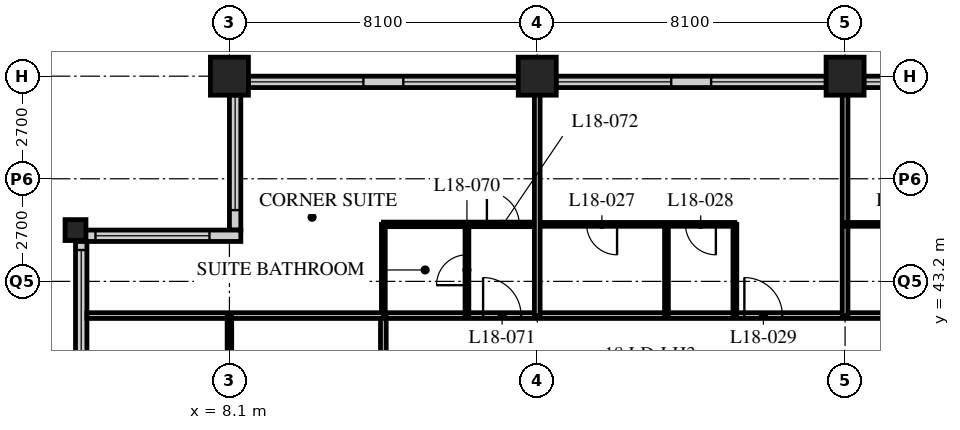
"""IFC4 building model, lengths in metres.
Left out: names, types, materials, properties, quantities, classifications, styles, units other than length and angle.
Written with IfcOpenShell. Run it as: python <this file> out.ifc"""

import sys

from ifc_helpers import new_model, si_unit, direction, frame, frame_2d, origin, origin_2d, place, context, subcontext, project, spatial, rectangle, hollow_rectangle, extrude, element, fill, save


model = new_model("IFC4")
c1 = context("Model", 3, precision=1e-05, world=origin(), true_north=direction((0.0, 1.0)))
c2 = subcontext(c1, "Body", "Model", "MODEL_VIEW")
j1 = project(units=[si_unit("LENGTHUNIT", "METRE"), si_unit("PLANEANGLEUNIT", "RADIAN")], contexts=[c1])
p1 = place(None, origin())
s1 = spatial("IfcSite", under=j1, at=p1, CompositionType="ELEMENT")
p2 = place(p1, origin())
s2 = spatial("IfcBuilding", under=s1, at=p2, CompositionType="ELEMENT")
p3 = place(p2, frame((0.0, 0.0, 73.8)))
s3 = spatial("IfcBuildingStorey", under=s2, at=p3, CompositionType="ELEMENT", Elevation=73.8)
p4 = place(p3, frame((4.05, 44.55, 0.0), z_axis=(0.0, 0.0, 1.0), x_axis=(1.0, 0.0, 0.0)))
e1 = element("IfcColumn", 1, at=p4, inside=s3, PredefinedType="COLUMN", context=c2, shape_type="SweptSolid", body=[
    extrude(hollow_rectangle(XDim=0.55, YDim=0.55, WallThickness=0.05, at=origin_2d()), origin(), (0.0, 0.0, 1.0), 3.4),
])
for number, where, z_axis, x_axis in (
    (2, (8.1, 48.6, 0.0), (0.0, 0.0, 1.0), (1.0, 0.0, 0.0)),
    (3, (16.2, 48.6, 0.0), (0.0, 0.0, 1.0), (1.0, 0.0, 0.0)),
    (4, (24.3, 48.6, 0.0), (0.0, 0.0, 1.0), (1.0, 0.0, 0.0)),
):
    element("IfcColumn", number, at=place(p3, frame(where, z_axis=z_axis, x_axis=x_axis)), inside=s3, PredefinedType="COLUMN", context=c2, shape_type="SweptSolid", body=[
        extrude(hollow_rectangle(XDim=1.0, YDim=1.0, WallThickness=0.1, at=origin_2d()), origin(), (0.0, 0.0, 1.0), 3.4),
    ])
p5 = place(p3, frame((48.3, 48.45, 0.0), z_axis=(0.0, 0.0, 1.0), x_axis=(-1.0, 0.0, 0.0)))
e5 = element("IfcWall", 5, at=p5, inside=s3, PredefinedType="SOLIDWALL", context=c2, shape_type="SweptSolid", body=[
    extrude(rectangle(XDim=40.2, YDim=0.3, at=frame_2d((20.1, 0.0))), origin(), (0.0, 0.0, 1.0), 3.19),
])
p6 = place(p5, frame((0.225, 0.0, 0.9)))
e6 = element("IfcOpeningElement", 6, at=p6, cuts=e5, PredefinedType="OPENING", context=c2, shape_type="SweptSolid", body=[
    extrude(rectangle(XDim=3.0, YDim=2.0, at=frame_2d((1.5, 1.0))), frame((0.0, 0.16, 0.0), z_axis=(0.0, -1.0, 0.0), x_axis=(1.0, 0.0, 0.0)), (0.0, 0.0, 1.0), 0.32),
])
p7 = place(p5, frame((4.275, 0.0, 0.9)))
e7 = element("IfcOpeningElement", 7, at=p7, cuts=e5, PredefinedType="OPENING", context=c2, shape_type="SweptSolid", body=[
    extrude(rectangle(XDim=3.0, YDim=2.0, at=frame_2d((1.5, 1.0))), frame((0.0, 0.16, 0.0), z_axis=(0.0, -1.0, 0.0), x_axis=(1.0, 0.0, 0.0)), (0.0, 0.0, 1.0), 0.32),
])
p8 = place(p5, frame((8.325, 0.0, 0.9)))
e8 = element("IfcOpeningElement", 8, at=p8, cuts=e5, PredefinedType="OPENING", context=c2, shape_type="SweptSolid", body=[
    extrude(rectangle(XDim=3.0, YDim=2.0, at=frame_2d((1.5, 1.0))), frame((0.0, 0.16, 0.0), z_axis=(0.0, -1.0, 0.0), x_axis=(1.0, 0.0, 0.0)), (0.0, 0.0, 1.0), 0.32),
])
p9 = place(p5, frame((12.375, 0.0, 0.9)))
e9 = element("IfcOpeningElement", 9, at=p9, cuts=e5, PredefinedType="OPENING", context=c2, shape_type="SweptSolid", body=[
    extrude(rectangle(XDim=3.0, YDim=2.0, at=frame_2d((1.5, 1.0))), frame((0.0, 0.16, 0.0), z_axis=(0.0, -1.0, 0.0), x_axis=(1.0, 0.0, 0.0)), (0.0, 0.0, 1.0), 0.32),
])
p10 = place(p5, frame((16.425, 0.0, 0.9)))
e10 = element("IfcOpeningElement", 10, at=p10, cuts=e5, PredefinedType="OPENING", context=c2, shape_type="SweptSolid", body=[
    extrude(rectangle(XDim=3.0, YDim=2.0, at=frame_2d((1.5, 1.0))), frame((0.0, 0.16, 0.0), z_axis=(0.0, -1.0, 0.0), x_axis=(1.0, 0.0, 0.0)), (0.0, 0.0, 1.0), 0.32),
])
p11 = place(p5, frame((20.475, 0.0, 0.9)))
e11 = element("IfcOpeningElement", 11, at=p11, cuts=e5, PredefinedType="OPENING", context=c2, shape_type="SweptSolid", body=[
    extrude(rectangle(XDim=3.0, YDim=2.0, at=frame_2d((1.5, 1.0))), frame((0.0, 0.16, 0.0), z_axis=(0.0, -1.0, 0.0), x_axis=(1.0, 0.0, 0.0)), (0.0, 0.0, 1.0), 0.32),
])
p12 = place(p5, frame((24.525, 0.0, 0.9)))
e12 = element("IfcOpeningElement", 12, at=p12, cuts=e5, PredefinedType="OPENING", context=c2, shape_type="SweptSolid", body=[
    extrude(rectangle(XDim=3.0, YDim=2.0, at=frame_2d((1.5, 1.0))), frame((0.0, 0.16, 0.0), z_axis=(0.0, -1.0, 0.0), x_axis=(1.0, 0.0, 0.0)), (0.0, 0.0, 1.0), 0.32),
])
p13 = place(p5, frame((28.575, 0.0, 0.9)))
e13 = element("IfcOpeningElement", 13, at=p13, cuts=e5, PredefinedType="OPENING", context=c2, shape_type="SweptSolid", body=[
    extrude(rectangle(XDim=3.0, YDim=2.0, at=frame_2d((1.5, 1.0))), frame((0.0, 0.16, 0.0), z_axis=(0.0, -1.0, 0.0), x_axis=(1.0, 0.0, 0.0)), (0.0, 0.0, 1.0), 0.32),
])
p14 = place(p5, frame((32.625, 0.0, 0.9)))
e14 = element("IfcOpeningElement", 14, at=p14, cuts=e5, PredefinedType="OPENING", context=c2, shape_type="SweptSolid", body=[
    extrude(rectangle(XDim=3.0, YDim=2.0, at=frame_2d((1.5, 1.0))), frame((0.0, 0.16, 0.0), z_axis=(0.0, -1.0, 0.0), x_axis=(1.0, 0.0, 0.0)), (0.0, 0.0, 1.0), 0.32),
])
p15 = place(p5, frame((36.675, 0.0, 0.9)))
e15 = element("IfcOpeningElement", 15, at=p15, cuts=e5, PredefinedType="OPENING", context=c2, shape_type="SweptSolid", body=[
    extrude(rectangle(XDim=3.0, YDim=2.0, at=frame_2d((1.5, 1.0))), frame((0.0, 0.16, 0.0), z_axis=(0.0, -1.0, 0.0), x_axis=(1.0, 0.0, 0.0)), (0.0, 0.0, 1.0), 0.32),
])
p16 = place(p3, frame((8.25, 48.3, 0.0), z_axis=(0.0, 0.0, 1.0), x_axis=(0.0, -1.0, 0.0)))
e16 = element("IfcWall", 16, at=p16, inside=s3, PredefinedType="SOLIDWALL", context=c2, shape_type="SweptSolid", body=[
    extrude(rectangle(XDim=3.75, YDim=0.3, at=frame_2d((1.875, 0.0))), origin(), (0.0, 0.0, 1.0), 3.19),
])
p17 = place(p16, frame((0.225, 0.0, 0.9)))
e17 = element("IfcOpeningElement", 17, at=p17, cuts=e16, PredefinedType="OPENING", context=c2, shape_type="SweptSolid", body=[
    extrude(rectangle(XDim=3.0, YDim=1.5, at=frame_2d((1.5, 0.75))), frame((0.0, 0.16, 0.0), z_axis=(0.0, -1.0, 0.0), x_axis=(1.0, 0.0, 0.0)), (0.0, 0.0, 1.0), 0.32),
])
p18 = place(p3, frame((8.4, 44.4, 0.0), z_axis=(0.0, 0.0, 1.0), x_axis=(-1.0, 0.0, 0.0)))
e18 = element("IfcWall", 18, at=p18, inside=s3, PredefinedType="SOLIDWALL", context=c2, shape_type="SweptSolid", body=[
    extrude(rectangle(XDim=4.35, YDim=0.3, at=frame_2d((2.175, 0.0))), origin(), (0.0, 0.0, 1.0), 3.19),
])
p19 = place(p18, frame((0.825, 0.0, 0.9)))
e19 = element("IfcOpeningElement", 19, at=p19, cuts=e18, PredefinedType="OPENING", context=c2, shape_type="SweptSolid", body=[
    extrude(rectangle(XDim=3.0, YDim=1.5, at=frame_2d((1.5, 0.75))), frame((0.0, 0.16, 0.0), z_axis=(0.0, -1.0, 0.0), x_axis=(1.0, 0.0, 0.0)), (0.0, 0.0, 1.0), 0.32),
])
p20 = place(p3, frame((4.2, 44.25, 0.0), z_axis=(0.0, 0.0, 1.0), x_axis=(0.0, -1.0, 0.0)))
e20 = element("IfcWall", 20, at=p20, inside=s3, PredefinedType="SOLIDWALL", context=c2, shape_type="SweptSolid", body=[
    extrude(rectangle(XDim=3.75, YDim=0.3, at=frame_2d((1.875, 0.0))), origin(), (0.0, 0.0, 1.0), 3.19),
])
p21 = place(p20, frame((0.225, 0.0, 0.9)))
e21 = element("IfcOpeningElement", 21, at=p21, cuts=e20, PredefinedType="OPENING", context=c2, shape_type="SweptSolid", body=[
    extrude(rectangle(XDim=3.0, YDim=1.5, at=frame_2d((1.5, 0.75))), frame((0.0, 0.16, 0.0), z_axis=(0.0, -1.0, 0.0), x_axis=(1.0, 0.0, 0.0)), (0.0, 0.0, 1.0), 0.32),
])
p22 = place(p3, frame((12.15, 42.3, 0.0), z_axis=(0.0, 0.0, 1.0), x_axis=(1.0, 0.0, 0.0)))
e22 = element("IfcWall", 22, at=p22, inside=s3, PredefinedType="PARTITIONING", context=c2, shape_type="SweptSolid", body=[
    extrude(rectangle(XDim=36.45, YDim=0.15, at=frame_2d((18.225, 0.0))), origin(), (0.0, 0.0, 1.0), 3.19),
])
p23 = place(p22, frame((9.5, 0.0, 0.0)))
e23 = element("IfcOpeningElement", 23, at=p23, cuts=e22, PredefinedType="OPENING", context=c2, shape_type="SweptSolid", body=[
    extrude(rectangle(XDim=1.0, YDim=2.1, at=frame_2d((0.5, 1.05))), frame((0.0, 0.085, 0.0), z_axis=(0.0, -1.0, 0.0), x_axis=(1.0, 0.0, 0.0)), (0.0, 0.0, 1.0), 0.17),
])
p24 = place(p22, frame((17.6, 0.0, 0.0)))
e24 = element("IfcOpeningElement", 24, at=p24, cuts=e22, PredefinedType="OPENING", context=c2, shape_type="SweptSolid", body=[
    extrude(rectangle(XDim=1.0, YDim=2.1, at=frame_2d((0.5, 1.05))), frame((0.0, 0.085, 0.0), z_axis=(0.0, -1.0, 0.0), x_axis=(1.0, 0.0, 0.0)), (0.0, 0.0, 1.0), 0.17),
])
p25 = place(p22, frame((22.7, 0.0, 0.0)))
e25 = element("IfcOpeningElement", 25, at=p25, cuts=e22, PredefinedType="OPENING", context=c2, shape_type="SweptSolid", body=[
    extrude(rectangle(XDim=1.0, YDim=2.1, at=frame_2d((0.5, 1.05))), frame((0.0, 0.085, 0.0), z_axis=(0.0, -1.0, 0.0), x_axis=(1.0, 0.0, 0.0)), (0.0, 0.0, 1.0), 0.17),
])
p26 = place(p22, frame((26.75, 0.0, 0.0)))
e26 = element("IfcOpeningElement", 26, at=p26, cuts=e22, PredefinedType="OPENING", context=c2, shape_type="SweptSolid", body=[
    extrude(rectangle(XDim=1.0, YDim=2.1, at=frame_2d((0.5, 1.05))), frame((0.0, 0.085, 0.0), z_axis=(0.0, -1.0, 0.0), x_axis=(1.0, 0.0, 0.0)), (0.0, 0.0, 1.0), 0.17),
])
p27 = place(p22, frame((30.8, 0.0, 0.0)))
e27 = element("IfcOpeningElement", 27, at=p27, cuts=e22, PredefinedType="OPENING", context=c2, shape_type="SweptSolid", body=[
    extrude(rectangle(XDim=1.0, YDim=2.1, at=frame_2d((0.5, 1.05))), frame((0.0, 0.085, 0.0), z_axis=(0.0, -1.0, 0.0), x_axis=(1.0, 0.0, 0.0)), (0.0, 0.0, 1.0), 0.17),
])
p28 = place(p22, frame((32.825, 0.0, 0.0)))
e28 = element("IfcOpeningElement", 28, at=p28, cuts=e22, PredefinedType="OPENING", context=c2, shape_type="SweptSolid", body=[
    extrude(rectangle(XDim=1.0, YDim=2.1, at=frame_2d((0.5, 1.05))), frame((0.0, 0.085, 0.0), z_axis=(0.0, -1.0, 0.0), x_axis=(1.0, 0.0, 0.0)), (0.0, 0.0, 1.0), 0.17),
])
p29 = place(p22, frame((2.625, 0.0, 0.0)))
e29 = element("IfcOpeningElement", 29, at=p29, cuts=e22, PredefinedType="OPENING", context=c2, shape_type="SweptSolid", body=[
    extrude(rectangle(XDim=1.0, YDim=2.1, at=frame_2d((0.5, 1.05))), frame((0.0, 0.085, 0.0), z_axis=(0.0, -1.0, 0.0), x_axis=(1.0, 0.0, 0.0)), (0.0, 0.0, 1.0), 0.17),
])
p30 = place(p3, frame((12.15, 16.2, 0.0), z_axis=(0.0, 0.0, 1.0), x_axis=(0.0, 1.0, 0.0)))
e30 = element("IfcWall", 30, at=p30, inside=s3, PredefinedType="PARTITIONING", context=c2, shape_type="SweptSolid", body=[
    extrude(rectangle(XDim=26.1, YDim=0.15, at=frame_2d((13.05, 0.0))), origin(), (0.0, 0.0, 1.0), 3.19),
])
p31 = place(p30, frame((0.3, 0.0, 0.0)))
e31 = element("IfcOpeningElement", 31, at=p31, cuts=e30, PredefinedType="OPENING", context=c2, shape_type="SweptSolid", body=[
    extrude(rectangle(XDim=1.0, YDim=2.1, at=frame_2d((0.5, 1.05))), frame((0.0, 0.085, 0.0), z_axis=(0.0, -1.0, 0.0), x_axis=(1.0, 0.0, 0.0)), (0.0, 0.0, 1.0), 0.17),
])
p32 = place(p30, frame((6.5, 0.0, 0.0)))
e32 = element("IfcOpeningElement", 32, at=p32, cuts=e30, PredefinedType="OPENING", context=c2, shape_type="SweptSolid", body=[
    extrude(rectangle(XDim=1.0, YDim=2.1, at=frame_2d((0.5, 1.05))), frame((0.0, 0.085, 0.0), z_axis=(0.0, -1.0, 0.0), x_axis=(1.0, 0.0, 0.0)), (0.0, 0.0, 1.0), 0.17),
])
p33 = place(p30, frame((13.55, 0.0, 0.0)))
e33 = element("IfcOpeningElement", 33, at=p33, cuts=e30, PredefinedType="OPENING", context=c2, shape_type="SweptSolid", body=[
    extrude(rectangle(XDim=1.0, YDim=2.1, at=frame_2d((0.5, 1.05))), frame((0.0, 0.085, 0.0), z_axis=(0.0, -1.0, 0.0), x_axis=(1.0, 0.0, 0.0)), (0.0, 0.0, 1.0), 0.17),
])
p34 = place(p30, frame((21.65, 0.0, 0.0)))
e34 = element("IfcOpeningElement", 34, at=p34, cuts=e30, PredefinedType="OPENING", context=c2, shape_type="SweptSolid", body=[
    extrude(rectangle(XDim=1.0, YDim=2.1, at=frame_2d((0.5, 1.05))), frame((0.0, 0.085, 0.0), z_axis=(0.0, -1.0, 0.0), x_axis=(1.0, 0.0, 0.0)), (0.0, 0.0, 1.0), 0.17),
])
p35 = place(p3, frame((16.2, 44.7, 0.0), z_axis=(0.0, 0.0, 1.0), x_axis=(1.0, 0.0, 0.0)))
e35 = element("IfcWall", 35, at=p35, inside=s3, PredefinedType="PARTITIONING", context=c2, shape_type="SweptSolid", body=[
    extrude(rectangle(XDim=5.2, YDim=0.1, at=frame_2d((2.6, 0.0))), origin(), (0.0, 0.0, 1.0), 3.19),
])
p36 = place(p35, frame((1.3, 0.0, 0.0)))
e36 = element("IfcOpeningElement", 36, at=p36, cuts=e35, PredefinedType="OPENING", context=c2, shape_type="SweptSolid", body=[
    extrude(rectangle(XDim=0.8, YDim=2.1, at=frame_2d((0.4, 1.05))), frame((0.0, 0.06, 0.0), z_axis=(0.0, -1.0, 0.0), x_axis=(1.0, 0.0, 0.0)), (0.0, 0.0, 1.0), 0.12),
])
p37 = place(p35, frame((3.9, 0.0, 0.0)))
e37 = element("IfcOpeningElement", 37, at=p37, cuts=e35, PredefinedType="OPENING", context=c2, shape_type="SweptSolid", body=[
    extrude(rectangle(XDim=0.8, YDim=2.1, at=frame_2d((0.4, 1.05))), frame((0.0, 0.06, 0.0), z_axis=(0.0, -1.0, 0.0), x_axis=(1.0, 0.0, 0.0)), (0.0, 0.0, 1.0), 0.12),
])
for number, where, z_axis, x_axis in (
    (38, (19.6, 42.3, 0.0), (0.0, 0.0, 1.0), (0.0, 1.0, 0.0)),
    (39, (21.4, 42.3, 0.0), (0.0, 0.0, 1.0), (0.0, 1.0, 0.0)),
):
    element("IfcWall", number, at=place(p3, frame(where, z_axis=z_axis, x_axis=x_axis)), inside=s3, PredefinedType="PARTITIONING", context=c2, shape_type="SweptSolid", body=[
        extrude(rectangle(XDim=2.4, YDim=0.1, at=frame_2d((1.2, 0.0))), origin(), (0.0, 0.0, 1.0), 3.19),
    ])
p38 = place(p3, frame((24.3, 42.3, 0.0), z_axis=(0.0, 0.0, 1.0), x_axis=(0.0, 1.0, 0.0)))
e40 = element("IfcWall", 40, at=p38, inside=s3, PredefinedType="PARTITIONING", context=c2, shape_type="SweptSolid", body=[
    extrude(rectangle(XDim=6.0, YDim=0.15, at=frame_2d((3.0, 0.0))), origin(), (0.0, 0.0, 1.0), 2.578),
])
p39 = place(p3, frame((24.3, 44.7, 0.0), z_axis=(0.0, 0.0, 1.0), x_axis=(1.0, 0.0, 0.0)))
e41 = element("IfcWall", 41, at=p39, inside=s3, PredefinedType="PARTITIONING", context=c2, shape_type="SweptSolid", body=[
    extrude(rectangle(XDim=5.2, YDim=0.1, at=frame_2d((2.6, 0.0))), origin(), (0.0, 0.0, 1.0), 3.19),
])
p40 = place(p39, frame((1.3, 0.0, 0.0)))
e42 = element("IfcOpeningElement", 42, at=p40, cuts=e41, PredefinedType="OPENING", context=c2, shape_type="SweptSolid", body=[
    extrude(rectangle(XDim=0.8, YDim=2.1, at=frame_2d((0.4, 1.05))), frame((0.0, 0.06, 0.0), z_axis=(0.0, -1.0, 0.0), x_axis=(1.0, 0.0, 0.0)), (0.0, 0.0, 1.0), 0.12),
])
p41 = place(p39, frame((3.9, 0.0, 0.0)))
e43 = element("IfcOpeningElement", 43, at=p41, cuts=e41, PredefinedType="OPENING", context=c2, shape_type="SweptSolid", body=[
    extrude(rectangle(XDim=0.8, YDim=2.1, at=frame_2d((0.4, 1.05))), frame((0.0, 0.06, 0.0), z_axis=(0.0, -1.0, 0.0), x_axis=(1.0, 0.0, 0.0)), (0.0, 0.0, 1.0), 0.12),
])
p42 = place(p3, frame((12.15, 44.7, 0.0), z_axis=(0.0, 0.0, 1.0), x_axis=(1.0, 0.0, 0.0)))
e44 = element("IfcWall", 44, at=p42, inside=s3, PredefinedType="PARTITIONING", context=c2, shape_type="SweptSolid", body=[
    extrude(rectangle(XDim=4.05, YDim=0.12, at=frame_2d((2.025, 0.0))), origin(), (0.0, 0.0, 1.0), 3.19),
])
p43 = place(p42, frame((2.725, 0.0, 0.0)))
e45 = element("IfcOpeningElement", 45, at=p43, cuts=e44, PredefinedType="OPENING", context=c2, shape_type="SweptSolid", body=[
    extrude(rectangle(XDim=0.85, YDim=2.1, at=frame_2d((0.425, 1.05))), frame((0.0, 0.07, 0.0), z_axis=(0.0, -1.0, 0.0), x_axis=(1.0, 0.0, 0.0)), (0.0, 0.0, 1.0), 0.14),
])
p44 = place(p3, frame((14.35, 42.3, 0.0), z_axis=(0.0, 0.0, 1.0), x_axis=(0.0, 1.0, 0.0)))
e46 = element("IfcWall", 46, at=p44, inside=s3, PredefinedType="PARTITIONING", context=c2, shape_type="SweptSolid", body=[
    extrude(rectangle(XDim=2.4, YDim=0.1, at=frame_2d((1.2, 0.0))), origin(), (0.0, 0.0, 1.0), 3.19),
])
p45 = place(p44, frame((0.8, 0.0, 0.0)))
e47 = element("IfcOpeningElement", 47, at=p45, cuts=e46, PredefinedType="OPENING", context=c2, shape_type="SweptSolid", body=[
    extrude(rectangle(XDim=0.8, YDim=2.1, at=frame_2d((0.4, 1.05))), frame((0.0, 0.06, 0.0), z_axis=(0.0, -1.0, 0.0), x_axis=(1.0, 0.0, 0.0)), (0.0, 0.0, 1.0), 0.12),
])
p46 = place(p3, frame((12.15, 42.3, 0.0), z_axis=(0.0, 0.0, 1.0), x_axis=(0.0, 1.0, 0.0)))
e48 = element("IfcWall", 48, at=p46, inside=s3, PredefinedType="PARTITIONING", context=c2, shape_type="SweptSolid", body=[
    extrude(rectangle(XDim=2.4, YDim=0.1, at=frame_2d((1.2, 0.0))), origin(), (0.0, 0.0, 1.0), 3.19),
])
p47 = place(p3, frame((4.35, 42.3, 0.0), z_axis=(0.0, 0.0, 1.0), x_axis=(1.0, 0.0, 0.0)))
e49 = element("IfcWall", 49, at=p47, inside=s3, PredefinedType="PARTITIONING", context=c2, shape_type="SweptSolid", body=[
    extrude(rectangle(XDim=7.8, YDim=0.15, at=frame_2d((3.9, 0.0))), origin(), (0.0, 0.0, 1.0), 3.19),
])
p48 = place(p3, frame((16.2, 42.3, 0.0), z_axis=(0.0, 0.0, 1.0), x_axis=(0.0, 1.0, 0.0)))
e50 = element("IfcWall", 50, at=p48, inside=s3, PredefinedType="PARTITIONING", context=c2, shape_type="SweptSolid", body=[
    extrude(rectangle(XDim=6.0, YDim=0.15, at=frame_2d((3.0, 0.0))), origin(), (0.0, 0.0, 1.0), 2.578),
])
p49 = place(p3, frame((8.1, 42.3, 0.0), z_axis=(0.0, 0.0, 1.0), x_axis=(0.0, -1.0, 0.0)))
e51 = element("IfcWall", 51, at=p49, inside=s3, PredefinedType="PARTITIONING", context=c2, shape_type="SweptSolid", body=[
    extrude(rectangle(XDim=1.35, YDim=0.12, at=frame_2d((0.675, 0.0))), origin(), (0.0, 0.0, 1.0), 2.578),
])
p50 = place(p11, origin())
e52 = element("IfcWindow", 52, at=p50, inside=s3, PartitioningType="SINGLE_PANEL", PredefinedType="WINDOW", context=c2, shape_type="SweptSolid", body=[
    extrude(rectangle(XDim=3.0, YDim=2.0, at=frame_2d((1.5, 1.0))), frame((0.0, 0.03, 0.0), z_axis=(0.0, -1.0, 0.0), x_axis=(1.0, 0.0, 0.0)), (0.0, 0.0, 1.0), 0.06),
])
fill(e11, e52)
p51 = place(p12, origin())
e53 = element("IfcWindow", 53, at=p51, inside=s3, PartitioningType="SINGLE_PANEL", PredefinedType="WINDOW", context=c2, shape_type="SweptSolid", body=[
    extrude(rectangle(XDim=3.0, YDim=2.0, at=frame_2d((1.5, 1.0))), frame((0.0, 0.03, 0.0), z_axis=(0.0, -1.0, 0.0), x_axis=(1.0, 0.0, 0.0)), (0.0, 0.0, 1.0), 0.06),
])
fill(e12, e53)
p52 = place(p13, origin())
e54 = element("IfcWindow", 54, at=p52, inside=s3, PartitioningType="SINGLE_PANEL", PredefinedType="WINDOW", context=c2, shape_type="SweptSolid", body=[
    extrude(rectangle(XDim=3.0, YDim=2.0, at=frame_2d((1.5, 1.0))), frame((0.0, 0.03, 0.0), z_axis=(0.0, -1.0, 0.0), x_axis=(1.0, 0.0, 0.0)), (0.0, 0.0, 1.0), 0.06),
])
fill(e13, e54)
p53 = place(p14, origin())
e55 = element("IfcWindow", 55, at=p53, inside=s3, PartitioningType="SINGLE_PANEL", PredefinedType="WINDOW", context=c2, shape_type="SweptSolid", body=[
    extrude(rectangle(XDim=3.0, YDim=2.0, at=frame_2d((1.5, 1.0))), frame((0.0, 0.03, 0.0), z_axis=(0.0, -1.0, 0.0), x_axis=(1.0, 0.0, 0.0)), (0.0, 0.0, 1.0), 0.06),
])
fill(e14, e55)
p54 = place(p15, origin())
e56 = element("IfcWindow", 56, at=p54, inside=s3, PartitioningType="SINGLE_PANEL", PredefinedType="WINDOW", context=c2, shape_type="SweptSolid", body=[
    extrude(rectangle(XDim=3.0, YDim=2.0, at=frame_2d((1.5, 1.0))), frame((0.0, 0.03, 0.0), z_axis=(0.0, -1.0, 0.0), x_axis=(1.0, 0.0, 0.0)), (0.0, 0.0, 1.0), 0.06),
])
fill(e15, e56)
p55 = place(p17, origin())
e57 = element("IfcWindow", 57, at=p55, inside=s3, PartitioningType="SINGLE_PANEL", PredefinedType="WINDOW", context=c2, shape_type="SweptSolid", body=[
    extrude(rectangle(XDim=3.0, YDim=1.5, at=frame_2d((1.5, 0.75))), frame((0.0, 0.03, 0.0), z_axis=(0.0, -1.0, 0.0), x_axis=(1.0, 0.0, 0.0)), (0.0, 0.0, 1.0), 0.06),
])
fill(e17, e57)
p56 = place(p19, origin())
e58 = element("IfcWindow", 58, at=p56, inside=s3, PartitioningType="SINGLE_PANEL", PredefinedType="WINDOW", context=c2, shape_type="SweptSolid", body=[
    extrude(rectangle(XDim=3.0, YDim=1.5, at=frame_2d((1.5, 0.75))), frame((0.0, 0.03, 0.0), z_axis=(0.0, -1.0, 0.0), x_axis=(1.0, 0.0, 0.0)), (0.0, 0.0, 1.0), 0.06),
])
fill(e19, e58)
p57 = place(p21, origin())
e59 = element("IfcWindow", 59, at=p57, inside=s3, PartitioningType="SINGLE_PANEL", PredefinedType="WINDOW", context=c2, shape_type="SweptSolid", body=[
    extrude(rectangle(XDim=3.0, YDim=1.5, at=frame_2d((1.5, 0.75))), frame((0.0, 0.03, 0.0), z_axis=(0.0, -1.0, 0.0), x_axis=(1.0, 0.0, 0.0)), (0.0, 0.0, 1.0), 0.06),
])
fill(e21, e59)
p58 = place(p36, origin())
e60 = element("IfcDoor", 60, at=p58, inside=s3, OperationType="SINGLE_SWING_LEFT", PredefinedType="DOOR", context=c2, shape_type="SweptSolid", body=[
    extrude(rectangle(XDim=0.8, YDim=2.1, at=frame_2d((0.4, 1.05))), frame((0.0, 0.025, 0.0), z_axis=(0.0, -1.0, 0.0), x_axis=(1.0, 0.0, 0.0)), (0.0, 0.0, 1.0), 0.05),
])
fill(e36, e60)
p59 = place(p37, origin())
e61 = element("IfcDoor", 61, at=p59, inside=s3, OperationType="SINGLE_SWING_LEFT", PredefinedType="DOOR", context=c2, shape_type="SweptSolid", body=[
    extrude(rectangle(XDim=0.8, YDim=2.1, at=frame_2d((0.4, 1.05))), frame((0.0, 0.025, 0.0), z_axis=(0.0, -1.0, 0.0), x_axis=(1.0, 0.0, 0.0)), (0.0, 0.0, 1.0), 0.05),
])
fill(e37, e61)
p60 = place(p23, origin())
e62 = element("IfcDoor", 62, at=p60, inside=s3, OperationType="SINGLE_SWING_LEFT", PredefinedType="DOOR", context=c2, shape_type="SweptSolid", body=[
    extrude(rectangle(XDim=1.0, YDim=2.1, at=frame_2d((0.5, 1.05))), frame((0.0, 0.025, 0.0), z_axis=(0.0, -1.0, 0.0), x_axis=(1.0, 0.0, 0.0)), (0.0, 0.0, 1.0), 0.05),
])
fill(e23, e62)
p61 = place(p45, origin())
e63 = element("IfcDoor", 63, at=p61, inside=s3, OperationType="SINGLE_SWING_LEFT", PredefinedType="DOOR", context=c2, shape_type="SweptSolid", body=[
    extrude(rectangle(XDim=0.8, YDim=2.1, at=frame_2d((0.4, 1.05))), frame((0.0, 0.025, 0.0), z_axis=(0.0, -1.0, 0.0), x_axis=(1.0, 0.0, 0.0)), (0.0, 0.0, 1.0), 0.05),
])
fill(e47, e63)
p62 = place(p29, origin())
e64 = element("IfcDoor", 64, at=p62, inside=s3, OperationType="SINGLE_SWING_LEFT", PredefinedType="DOOR", context=c2, shape_type="SweptSolid", body=[
    extrude(rectangle(XDim=1.0, YDim=2.1, at=frame_2d((0.5, 1.05))), frame((0.0, 0.025, 0.0), z_axis=(0.0, -1.0, 0.0), x_axis=(1.0, 0.0, 0.0)), (0.0, 0.0, 1.0), 0.05),
])
fill(e29, e64)
p63 = place(p43, origin())
e65 = element("IfcDoor", 65, at=p63, inside=s3, OperationType="SINGLE_SWING_LEFT", PredefinedType="DOOR", context=c2, shape_type="SweptSolid", body=[
    extrude(rectangle(XDim=0.85, YDim=2.1, at=frame_2d((0.425, 1.05))), frame((0.0, 0.025, 0.0), z_axis=(0.0, -1.0, 0.0), x_axis=(1.0, 0.0, 0.0)), (0.0, 0.0, 1.0), 0.05),
])
fill(e45, e65)
save(model, sys.argv[1])
